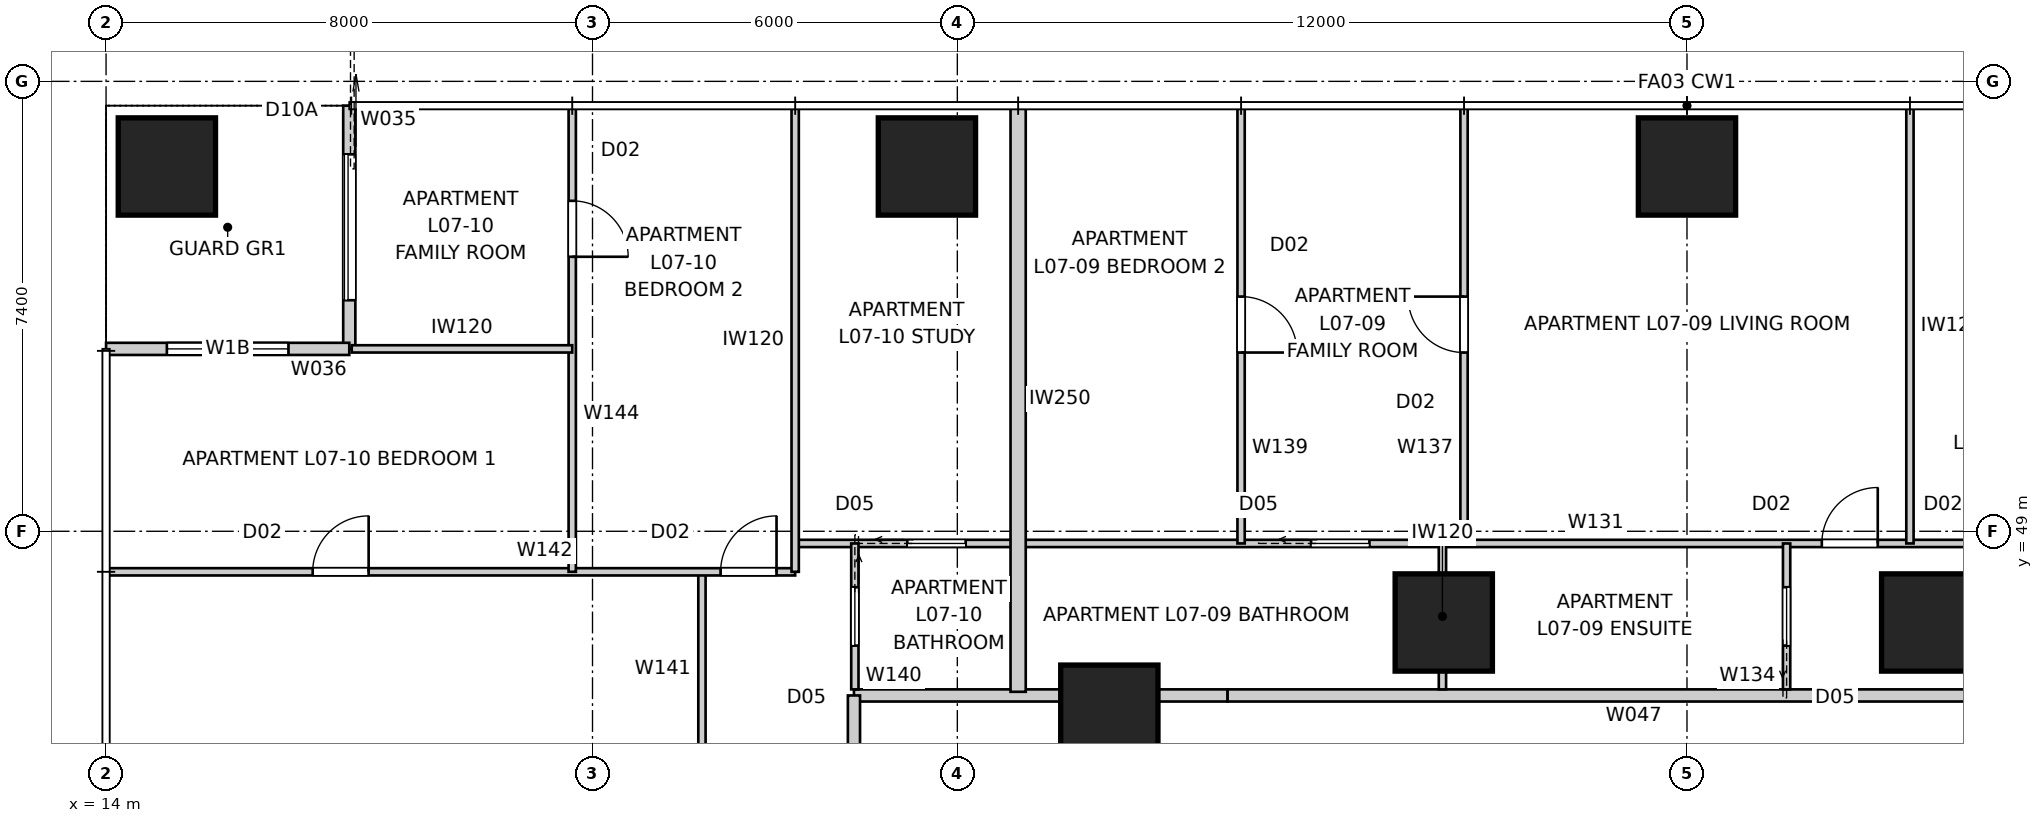
"""IFC4 building model, lengths in metres.
Left out: names, types, materials, properties, quantities, classifications, styles, units other than length and angle.
Written with IfcOpenShell. Run it as: python <this file> out.ifc"""

import sys

from ifc_helpers import new_model, si_unit, direction, frame, frame_2d, origin, origin_2d, place, context, subcontext, project, spatial, rectangle, extrude, element, fill, save


model = new_model("IFC4")
c1 = context("Model", 3, precision=1e-05, world=origin(), true_north=direction((0.0, 1.0)))
c2 = subcontext(c1, "Body", "Model", "MODEL_VIEW")
j1 = project(units=[si_unit("LENGTHUNIT", "METRE"), si_unit("PLANEANGLEUNIT", "RADIAN")], contexts=[c1])
p1 = place(None, origin())
s1 = spatial("IfcSite", under=j1, at=p1, CompositionType="ELEMENT")
p2 = place(p1, origin())
s2 = spatial("IfcBuilding", under=s1, at=p2, CompositionType="ELEMENT")
p3 = place(p2, frame((0.0, 0.0, 28.6)))
s3 = spatial("IfcBuildingStorey", under=s2, at=p3, CompositionType="ELEMENT", Elevation=28.6)
for number, where, z_axis, x_axis in (
    (1, (40.0, 55.0, 0.0), (0.0, 0.0, 1.0), (1.0, 0.0, 0.0)),
    (2, (27.5, 55.0, 0.0), (0.0, 0.0, 1.0), (1.0, 0.0, 0.0)),
    (3, (15.0, 55.0, 0.0), (0.0, 0.0, 1.0), (1.0, 0.0, 0.0)),
    (4, (44.0, 47.5, 0.0), (0.0, 0.0, 1.0), (1.0, 0.0, 0.0)),
    (5, (36.0, 47.5, 0.0), (0.0, 0.0, 1.0), (1.0, 0.0, 0.0)),
    (6, (30.5, 46.0, 0.0), (0.0, 0.0, 1.0), (1.0, 0.0, 0.0)),
):
    element("IfcColumn", number, at=place(p3, frame(where, z_axis=z_axis, x_axis=x_axis)), inside=s3, PredefinedType="COLUMN", context=c2, shape_type="SweptSolid", body=[
        extrude(rectangle(XDim=1.6, YDim=1.6, at=origin_2d()), origin(), (0.0, 0.0, 1.0), 3.4),
    ])
p4 = place(p3, frame((18.0, 56.0, 0.0), z_axis=(0.0, 0.0, 1.0), x_axis=(0.0, -1.0, 0.0)))
e7 = element("IfcWall", 7, at=p4, inside=s3, PredefinedType="SOLIDWALL", context=c2, shape_type="SweptSolid", body=[
    extrude(rectangle(XDim=4.0, YDim=0.2, at=frame_2d((2.0, 0.0))), origin(), (0.0, 0.0, 1.0), 3.25),
])
p5 = place(p4, frame((0.8, 0.0, 0.0)))
e8 = element("IfcOpeningElement", 8, at=p5, cuts=e7, PredefinedType="OPENING", context=c2, shape_type="SweptSolid", body=[
    extrude(rectangle(XDim=2.4, YDim=2.1, at=frame_2d((1.2, 1.05))), frame((0.0, 0.11, 0.0), z_axis=(0.0, -1.0, 0.0), x_axis=(1.0, 0.0, 0.0)), (0.0, 0.0, 1.0), 0.22),
])
p6 = place(p3, frame((18.0, 52.0, 0.0), z_axis=(0.0, 0.0, 1.0), x_axis=(-1.0, 0.0, 0.0)))
e9 = element("IfcWall", 9, at=p6, inside=s3, PredefinedType="SOLIDWALL", context=c2, shape_type="SweptSolid", body=[
    extrude(rectangle(XDim=4.0, YDim=0.2, at=frame_2d((2.0, 0.0))), origin(), (0.0, 0.0, 1.0), 3.25),
])
p7 = place(p6, frame((1.0, 0.0, 0.45)))
e10 = element("IfcOpeningElement", 10, at=p7, cuts=e9, PredefinedType="OPENING", context=c2, shape_type="SweptSolid", body=[
    extrude(rectangle(XDim=2.0, YDim=1.8, at=frame_2d((1.0, 0.9))), frame((0.0, 0.11, 0.0), z_axis=(0.0, -1.0, 0.0), x_axis=(1.0, 0.0, 0.0)), (0.0, 0.0, 1.0), 0.22),
])
p8 = place(p3, frame((47.558, 46.3, 0.0), z_axis=(0.0, 0.0, 1.0), x_axis=(-1.0, 0.0, 0.0)))
e11 = element("IfcWall", 11, at=p8, inside=s3, PredefinedType="PARTITIONING", context=c2, shape_type="SweptSolid", body=[
    extrude(rectangle(XDim=15.117, YDim=0.2, at=frame_2d((7.558, 0.0))), origin(), (0.0, 0.0, 1.0), 3.25),
])
p9 = place(p8, frame((0.729, 0.0, 0.0)))
e12 = element("IfcOpeningElement", 12, at=p9, cuts=e11, PredefinedType="OPENING", context=c2, shape_type="SweptSolid", body=[
    extrude(rectangle(XDim=1.02, YDim=2.34, at=frame_2d((0.51, 1.17))), frame((0.0, 0.11, 0.0), z_axis=(0.0, -1.0, 0.0), x_axis=(1.0, 0.0, 0.0)), (0.0, 0.0, 1.0), 0.22),
])
p10 = place(p3, frame((32.442, 46.3, 0.0), z_axis=(0.0, 0.0, 1.0), x_axis=(-1.0, 0.0, 0.0)))
e13 = element("IfcWall", 13, at=p10, inside=s3, PredefinedType="PARTITIONING", context=c2, shape_type="SweptSolid", body=[
    extrude(rectangle(XDim=1.683, YDim=0.2, at=frame_2d((0.842, 0.0))), origin(), (0.0, 0.0, 1.0), 2.55),
])
p11 = place(p3, frame((30.758, 46.3, 0.0), z_axis=(0.0, 0.0, 1.0), x_axis=(-1.0, 0.0, 0.0)))
e14 = element("IfcWall", 14, at=p11, inside=s3, PredefinedType="PARTITIONING", context=c2, shape_type="SweptSolid", body=[
    extrude(rectangle(XDim=4.458, YDim=0.2, at=frame_2d((2.229, 0.0))), origin(), (0.0, 0.0, 1.0), 3.25),
])
p12 = place(p3, frame((26.3, 46.3, 0.0), z_axis=(0.0, 0.0, 1.0), x_axis=(0.0, -1.0, 0.0)))
e15 = element("IfcWall", 15, at=p12, inside=s3, PredefinedType="PARTITIONING", context=c2, shape_type="SweptSolid", body=[
    extrude(rectangle(XDim=32.6, YDim=0.2, at=frame_2d((16.3, 0.0))), origin(), (0.0, 0.0, 1.0), 3.25),
])
p13 = place(p12, frame((2.315, 0.0, 0.0)))
e16 = element("IfcOpeningElement", 16, at=p13, cuts=e15, PredefinedType="OPENING", context=c2, shape_type="SweptSolid", body=[
    extrude(rectangle(XDim=1.02, YDim=2.34, at=frame_2d((0.51, 1.17))), frame((0.0, 0.11, 0.0), z_axis=(0.0, -1.0, 0.0), x_axis=(1.0, 0.0, 0.0)), (0.0, 0.0, 1.0), 0.22),
])
p14 = place(p12, frame((10.624, 0.0, 0.0)))
e17 = element("IfcOpeningElement", 17, at=p14, cuts=e15, PredefinedType="OPENING", context=c2, shape_type="SweptSolid", body=[
    extrude(rectangle(XDim=1.02, YDim=2.34, at=frame_2d((0.51, 1.17))), frame((0.0, 0.11, 0.0), z_axis=(0.0, -1.0, 0.0), x_axis=(1.0, 0.0, 0.0)), (0.0, 0.0, 1.0), 0.22),
])
p15 = place(p12, frame((17.848, 0.0, 0.0)))
e18 = element("IfcOpeningElement", 18, at=p15, cuts=e15, PredefinedType="OPENING", context=c2, shape_type="SweptSolid", body=[
    extrude(rectangle(XDim=1.02, YDim=2.34, at=frame_2d((0.51, 1.17))), frame((0.0, 0.11, 0.0), z_axis=(0.0, -1.0, 0.0), x_axis=(1.0, 0.0, 0.0)), (0.0, 0.0, 1.0), 0.22),
])
p16 = place(p12, frame((30.516, 0.0, 0.0)))
e19 = element("IfcOpeningElement", 19, at=p16, cuts=e15, PredefinedType="OPENING", context=c2, shape_type="SweptSolid", body=[
    extrude(rectangle(XDim=1.02, YDim=2.34, at=frame_2d((0.51, 1.17))), frame((0.0, 0.11, 0.0), z_axis=(0.0, -1.0, 0.0), x_axis=(1.0, 0.0, 0.0)), (0.0, 0.0, 1.0), 0.22),
])
p17 = place(p3, frame((29.0, 56.0, 0.0), z_axis=(0.0, 0.0, 1.0), x_axis=(0.0, -1.0, 0.0)))
e20 = element("IfcWall", 20, at=p17, inside=s3, PredefinedType="PARTITIONING", context=c2, shape_type="SweptSolid", body=[
    extrude(rectangle(XDim=9.64, YDim=0.25, at=frame_2d((4.82, 0.0))), origin(), (0.0, 0.0, 1.0), 3.25),
])
p18 = place(p3, frame((25.333, 48.8, 0.0), z_axis=(0.0, 0.0, 1.0), x_axis=(1.0, 0.0, 0.0)))
e21 = element("IfcWall", 21, at=p18, inside=s3, PredefinedType="PARTITIONING", context=c2, shape_type="SweptSolid", body=[
    extrude(rectangle(XDim=29.333, YDim=0.12, at=frame_2d((14.667, 0.0))), origin(), (0.0, 0.0, 1.0), 3.25),
])
p19 = place(p18, frame((19.707, 0.0, 0.0)))
e22 = element("IfcOpeningElement", 22, at=p19, cuts=e21, PredefinedType="OPENING", context=c2, shape_type="SweptSolid", body=[
    extrude(rectangle(XDim=0.92, YDim=2.34, at=frame_2d((0.46, 1.17))), frame((0.0, 0.07, 0.0), z_axis=(0.0, -1.0, 0.0), x_axis=(1.0, 0.0, 0.0)), (0.0, 0.0, 1.0), 0.14),
])
p20 = place(p18, frame((23.348, 0.0, 0.0)))
e23 = element("IfcOpeningElement", 23, at=p20, cuts=e21, PredefinedType="OPENING", context=c2, shape_type="SweptSolid", body=[
    extrude(rectangle(XDim=0.92, YDim=2.34, at=frame_2d((0.46, 1.17))), frame((0.0, 0.07, 0.0), z_axis=(0.0, -1.0, 0.0), x_axis=(1.0, 0.0, 0.0)), (0.0, 0.0, 1.0), 0.14),
])
p21 = place(p18, frame((16.884, 0.0, 0.0)))
e24 = element("IfcOpeningElement", 24, at=p21, cuts=e21, PredefinedType="OPENING", context=c2, shape_type="SweptSolid", body=[
    extrude(rectangle(XDim=0.92, YDim=2.34, at=frame_2d((0.46, 1.17))), frame((0.0, 0.07, 0.0), z_axis=(0.0, -1.0, 0.0), x_axis=(1.0, 0.0, 0.0)), (0.0, 0.0, 1.0), 0.14),
])
p22 = place(p18, frame((26.549, 0.0, 0.0)))
e25 = element("IfcOpeningElement", 25, at=p22, cuts=e21, PredefinedType="OPENING", context=c2, shape_type="SweptSolid", body=[
    extrude(rectangle(XDim=0.96, YDim=2.1, at=frame_2d((0.48, 1.05))), frame((0.0, 0.07, 0.0), z_axis=(0.0, -1.0, 0.0), x_axis=(1.0, 0.0, 0.0)), (0.0, 0.0, 1.0), 0.14),
])
p23 = place(p18, frame((1.844, 0.0, 0.0)))
e26 = element("IfcOpeningElement", 26, at=p23, cuts=e21, PredefinedType="OPENING", context=c2, shape_type="SweptSolid", body=[
    extrude(rectangle(XDim=0.96, YDim=2.1, at=frame_2d((0.48, 1.05))), frame((0.0, 0.07, 0.0), z_axis=(0.0, -1.0, 0.0), x_axis=(1.0, 0.0, 0.0)), (0.0, 0.0, 1.0), 0.14),
])
p24 = place(p18, frame((8.484, 0.0, 0.0)))
e27 = element("IfcOpeningElement", 27, at=p24, cuts=e21, PredefinedType="OPENING", context=c2, shape_type="SweptSolid", body=[
    extrude(rectangle(XDim=0.96, YDim=2.1, at=frame_2d((0.48, 1.05))), frame((0.0, 0.07, 0.0), z_axis=(0.0, -1.0, 0.0), x_axis=(1.0, 0.0, 0.0)), (0.0, 0.0, 1.0), 0.14),
])
p25 = place(p3, frame((41.638, 46.4, 0.0), z_axis=(0.0, 0.0, 1.0), x_axis=(0.0, 1.0, 0.0)))
e28 = element("IfcWall", 28, at=p25, inside=s3, PredefinedType="PARTITIONING", context=c2, shape_type="SweptSolid", body=[
    extrude(rectangle(XDim=2.4, YDim=0.12, at=frame_2d((1.2, 0.0))), origin(), (0.0, 0.0, 1.0), 3.25),
])
p26 = place(p25, frame((0.72, 0.0, 0.0)))
e29 = element("IfcOpeningElement", 29, at=p26, cuts=e28, PredefinedType="OPENING", context=c2, shape_type="SweptSolid", body=[
    extrude(rectangle(XDim=0.96, YDim=2.1, at=frame_2d((0.48, 1.05))), frame((0.0, 0.07, 0.0), z_axis=(0.0, -1.0, 0.0), x_axis=(1.0, 0.0, 0.0)), (0.0, 0.0, 1.0), 0.14),
])
p27 = place(p3, frame((35.978, 48.8, 0.0), z_axis=(0.0, 0.0, 1.0), x_axis=(0.0, -1.0, 0.0)))
e30 = element("IfcWall", 30, at=p27, inside=s3, PredefinedType="PARTITIONING", context=c2, shape_type="SweptSolid", body=[
    extrude(rectangle(XDim=2.4, YDim=0.12, at=frame_2d((1.2, 0.0))), origin(), (0.0, 0.0, 1.0), 3.25),
])
p28 = place(p3, frame((43.667, 55.96, 0.0), z_axis=(0.0, 0.0, 1.0), x_axis=(0.0, -1.0, 0.0)))
e31 = element("IfcWall", 31, at=p28, inside=s3, PredefinedType="PARTITIONING", context=c2, shape_type="SweptSolid", body=[
    extrude(rectangle(XDim=7.16, YDim=0.12, at=frame_2d((3.58, 0.0))), origin(), (0.0, 0.0, 1.0), 3.25),
])
p29 = place(p3, frame((36.333, 48.8, 0.0), z_axis=(0.0, 0.0, 1.0), x_axis=(0.0, 1.0, 0.0)))
e32 = element("IfcWall", 32, at=p29, inside=s3, PredefinedType="PARTITIONING", context=c2, shape_type="SweptSolid", body=[
    extrude(rectangle(XDim=7.16, YDim=0.12, at=frame_2d((3.58, 0.0))), origin(), (0.0, 0.0, 1.0), 3.25),
])
p30 = place(p29, frame((3.14, 0.0, 0.0)))
e33 = element("IfcOpeningElement", 33, at=p30, cuts=e32, PredefinedType="OPENING", context=c2, shape_type="SweptSolid", body=[
    extrude(rectangle(XDim=0.92, YDim=2.34, at=frame_2d((0.46, 1.17))), frame((0.0, 0.07, 0.0), z_axis=(0.0, -1.0, 0.0), x_axis=(1.0, 0.0, 0.0)), (0.0, 0.0, 1.0), 0.14),
])
p31 = place(p3, frame((32.667, 55.96, 0.0), z_axis=(0.0, 0.0, 1.0), x_axis=(0.0, -1.0, 0.0)))
e34 = element("IfcWall", 34, at=p31, inside=s3, PredefinedType="PARTITIONING", context=c2, shape_type="SweptSolid", body=[
    extrude(rectangle(XDim=7.16, YDim=0.12, at=frame_2d((3.58, 0.0))), origin(), (0.0, 0.0, 1.0), 3.25),
])
p32 = place(p31, frame((3.1, 0.0, 0.0)))
e35 = element("IfcOpeningElement", 35, at=p32, cuts=e34, PredefinedType="OPENING", context=c2, shape_type="SweptSolid", body=[
    extrude(rectangle(XDim=0.92, YDim=2.34, at=frame_2d((0.46, 1.17))), frame((0.0, 0.07, 0.0), z_axis=(0.0, -1.0, 0.0), x_axis=(1.0, 0.0, 0.0)), (0.0, 0.0, 1.0), 0.14),
])
p33 = place(p3, frame((26.315, 48.8, 0.0), z_axis=(0.0, 0.0, 1.0), x_axis=(0.0, -1.0, 0.0)))
e36 = element("IfcWall", 36, at=p33, inside=s3, PredefinedType="PARTITIONING", context=c2, shape_type="SweptSolid", body=[
    extrude(rectangle(XDim=2.4, YDim=0.12, at=frame_2d((1.2, 0.0))), origin(), (0.0, 0.0, 1.0), 3.25),
])
p34 = place(p33, frame((0.72, 0.0, 0.0)))
e37 = element("IfcOpeningElement", 37, at=p34, cuts=e36, PredefinedType="OPENING", context=c2, shape_type="SweptSolid", body=[
    extrude(rectangle(XDim=0.96, YDim=2.1, at=frame_2d((0.48, 1.05))), frame((0.0, 0.07, 0.0), z_axis=(0.0, -1.0, 0.0), x_axis=(1.0, 0.0, 0.0)), (0.0, 0.0, 1.0), 0.14),
])
p35 = place(p3, frame((23.8, 41.0, 0.0), z_axis=(0.0, 0.0, 1.0), x_axis=(0.0, 1.0, 0.0)))
e38 = element("IfcWall", 38, at=p35, inside=s3, PredefinedType="PARTITIONING", context=c2, shape_type="SweptSolid", body=[
    extrude(rectangle(XDim=7.333, YDim=0.12, at=frame_2d((3.667, 0.0))), origin(), (0.0, 0.0, 1.0), 3.25),
])
p36 = place(p35, frame((3.207, 0.0, 0.0)))
e39 = element("IfcOpeningElement", 39, at=p36, cuts=e38, PredefinedType="OPENING", context=c2, shape_type="SweptSolid", body=[
    extrude(rectangle(XDim=0.92, YDim=2.34, at=frame_2d((0.46, 1.17))), frame((0.0, 0.07, 0.0), z_axis=(0.0, -1.0, 0.0), x_axis=(1.0, 0.0, 0.0)), (0.0, 0.0, 1.0), 0.14),
])
p37 = place(p3, frame((14.04, 48.333, 0.0), z_axis=(0.0, 0.0, 1.0), x_axis=(1.0, 0.0, 0.0)))
e40 = element("IfcWall", 40, at=p37, inside=s3, PredefinedType="PARTITIONING", context=c2, shape_type="SweptSolid", body=[
    extrude(rectangle(XDim=11.293, YDim=0.12, at=frame_2d((5.646, 0.0))), origin(), (0.0, 0.0, 1.0), 3.25),
])
p38 = place(p37, frame((10.067, 0.0, 0.0)))
e41 = element("IfcOpeningElement", 41, at=p38, cuts=e40, PredefinedType="OPENING", context=c2, shape_type="SweptSolid", body=[
    extrude(rectangle(XDim=0.92, YDim=2.34, at=frame_2d((0.46, 1.17))), frame((0.0, 0.07, 0.0), z_axis=(0.0, -1.0, 0.0), x_axis=(1.0, 0.0, 0.0)), (0.0, 0.0, 1.0), 0.14),
])
p39 = place(p37, frame((3.358, 0.0, 0.0)))
e42 = element("IfcOpeningElement", 42, at=p39, cuts=e40, PredefinedType="OPENING", context=c2, shape_type="SweptSolid", body=[
    extrude(rectangle(XDim=0.92, YDim=2.34, at=frame_2d((0.46, 1.17))), frame((0.0, 0.07, 0.0), z_axis=(0.0, -1.0, 0.0), x_axis=(1.0, 0.0, 0.0)), (0.0, 0.0, 1.0), 0.14),
])
p40 = place(p3, frame((25.333, 48.333, 0.0), z_axis=(0.0, 0.0, 1.0), x_axis=(0.0, 1.0, 0.0)))
e43 = element("IfcWall", 43, at=p40, inside=s3, PredefinedType="PARTITIONING", context=c2, shape_type="SweptSolid", body=[
    extrude(rectangle(XDim=7.627, YDim=0.12, at=frame_2d((3.813, 0.0))), origin(), (0.0, 0.0, 1.0), 2.638),
])
p41 = place(p3, frame((21.667, 55.96, 0.0), z_axis=(0.0, 0.0, 1.0), x_axis=(0.0, -1.0, 0.0)))
e44 = element("IfcWall", 44, at=p41, inside=s3, PredefinedType="PARTITIONING", context=c2, shape_type="SweptSolid", body=[
    extrude(rectangle(XDim=7.627, YDim=0.12, at=frame_2d((3.813, 0.0))), origin(), (0.0, 0.0, 1.0), 3.25),
])
p42 = place(p41, frame((1.525, 0.0, 0.0)))
e45 = element("IfcOpeningElement", 45, at=p42, cuts=e44, PredefinedType="OPENING", context=c2, shape_type="SweptSolid", body=[
    extrude(rectangle(XDim=0.92, YDim=2.34, at=frame_2d((0.46, 1.17))), frame((0.0, 0.07, 0.0), z_axis=(0.0, -1.0, 0.0), x_axis=(1.0, 0.0, 0.0)), (0.0, 0.0, 1.0), 0.14),
])
p43 = place(p3, frame((18.04, 52.0, 0.0), z_axis=(0.0, 0.0, 1.0), x_axis=(1.0, 0.0, 0.0)))
e46 = element("IfcWall", 46, at=p43, inside=s3, PredefinedType="PARTITIONING", context=c2, shape_type="SweptSolid", body=[
    extrude(rectangle(XDim=3.627, YDim=0.12, at=frame_2d((1.813, 0.0))), origin(), (0.0, 0.0, 1.0), 3.25),
])
p44 = place(p5, origin())
e47 = element("IfcDoor", 47, at=p44, inside=s3, OperationType="SLIDING_TO_LEFT", PredefinedType="DOOR", context=c2, shape_type="SweptSolid", body=[
    extrude(rectangle(XDim=2.4, YDim=2.1, at=frame_2d((1.2, 1.05))), frame((0.0, 0.025, 0.0), z_axis=(0.0, -1.0, 0.0), x_axis=(1.0, 0.0, 0.0)), (0.0, 0.0, 1.0), 0.05),
])
fill(e8, e47)
p45 = place(p7, origin())
e48 = element("IfcWindow", 48, at=p45, inside=s3, PartitioningType="SINGLE_PANEL", PredefinedType="WINDOW", context=c2, shape_type="SweptSolid", body=[
    extrude(rectangle(XDim=2.0, YDim=1.8, at=frame_2d((1.0, 0.9))), frame((0.0, 0.03, 0.0), z_axis=(0.0, -1.0, 0.0), x_axis=(1.0, 0.0, 0.0)), (0.0, 0.0, 1.0), 0.06),
])
fill(e10, e48)
p46 = place(p26, origin())
e49 = element("IfcDoor", 49, at=p46, inside=s3, OperationType="SLIDING_TO_LEFT", PredefinedType="DOOR", context=c2, shape_type="SweptSolid", body=[
    extrude(rectangle(XDim=0.96, YDim=2.1, at=frame_2d((0.48, 1.05))), frame((0.0, 0.025, 0.0), z_axis=(0.0, -1.0, 0.0), x_axis=(1.0, 0.0, 0.0)), (0.0, 0.0, 1.0), 0.05),
])
fill(e29, e49)
p47 = place(p21, origin())
e50 = element("IfcDoor", 50, at=p47, inside=s3, OperationType="SINGLE_SWING_RIGHT", PredefinedType="DOOR", context=c2, shape_type="SweptSolid", body=[
    extrude(rectangle(XDim=0.92, YDim=2.34, at=frame_2d((0.46, 1.17))), frame((0.0, 0.025, 0.0), z_axis=(0.0, -1.0, 0.0), x_axis=(1.0, 0.0, 0.0)), (0.0, 0.0, 1.0), 0.05),
])
fill(e24, e50)
p48 = place(p34, origin())
e51 = element("IfcDoor", 51, at=p48, inside=s3, OperationType="SLIDING_TO_LEFT", PredefinedType="DOOR", context=c2, shape_type="SweptSolid", body=[
    extrude(rectangle(XDim=0.96, YDim=2.1, at=frame_2d((0.48, 1.05))), frame((0.0, 0.025, 0.0), z_axis=(0.0, -1.0, 0.0), x_axis=(1.0, 0.0, 0.0)), (0.0, 0.0, 1.0), 0.05),
])
fill(e37, e51)
p49 = place(p38, origin())
e52 = element("IfcDoor", 52, at=p49, inside=s3, OperationType="SINGLE_SWING_RIGHT", PredefinedType="DOOR", context=c2, shape_type="SweptSolid", body=[
    extrude(rectangle(XDim=0.92, YDim=2.34, at=frame_2d((0.46, 1.17))), frame((0.0, 0.025, 0.0), z_axis=(0.0, -1.0, 0.0), x_axis=(1.0, 0.0, 0.0)), (0.0, 0.0, 1.0), 0.05),
])
fill(e41, e52)
p50 = place(p30, origin())
e53 = element("IfcDoor", 53, at=p50, inside=s3, OperationType="SINGLE_SWING_RIGHT", PredefinedType="DOOR", context=c2, shape_type="SweptSolid", body=[
    extrude(rectangle(XDim=0.92, YDim=2.34, at=frame_2d((0.46, 1.17))), frame((0.0, 0.025, 0.0), z_axis=(0.0, -1.0, 0.0), x_axis=(1.0, 0.0, 0.0)), (0.0, 0.0, 1.0), 0.05),
])
fill(e33, e53)
p51 = place(p39, origin())
e54 = element("IfcDoor", 54, at=p51, inside=s3, OperationType="SINGLE_SWING_RIGHT", PredefinedType="DOOR", context=c2, shape_type="SweptSolid", body=[
    extrude(rectangle(XDim=0.92, YDim=2.34, at=frame_2d((0.46, 1.17))), frame((0.0, 0.025, 0.0), z_axis=(0.0, -1.0, 0.0), x_axis=(1.0, 0.0, 0.0)), (0.0, 0.0, 1.0), 0.05),
])
fill(e42, e54)
p52 = place(p23, origin())
e55 = element("IfcDoor", 55, at=p52, inside=s3, OperationType="SLIDING_TO_LEFT", PredefinedType="DOOR", context=c2, shape_type="SweptSolid", body=[
    extrude(rectangle(XDim=0.96, YDim=2.1, at=frame_2d((0.48, 1.05))), frame((0.0, 0.025, 0.0), z_axis=(0.0, -1.0, 0.0), x_axis=(1.0, 0.0, 0.0)), (0.0, 0.0, 1.0), 0.05),
])
fill(e26, e55)
p53 = place(p32, origin())
e56 = element("IfcDoor", 56, at=p53, inside=s3, OperationType="SINGLE_SWING_RIGHT", PredefinedType="DOOR", context=c2, shape_type="SweptSolid", body=[
    extrude(rectangle(XDim=0.92, YDim=2.34, at=frame_2d((0.46, 1.17))), frame((0.0, 0.025, 0.0), z_axis=(0.0, -1.0, 0.0), x_axis=(1.0, 0.0, 0.0)), (0.0, 0.0, 1.0), 0.05),
])
fill(e35, e56)
p54 = place(p24, origin())
e57 = element("IfcDoor", 57, at=p54, inside=s3, OperationType="SLIDING_TO_LEFT", PredefinedType="DOOR", context=c2, shape_type="SweptSolid", body=[
    extrude(rectangle(XDim=0.96, YDim=2.1, at=frame_2d((0.48, 1.05))), frame((0.0, 0.025, 0.0), z_axis=(0.0, -1.0, 0.0), x_axis=(1.0, 0.0, 0.0)), (0.0, 0.0, 1.0), 0.05),
])
fill(e27, e57)
p55 = place(p42, origin())
e58 = element("IfcDoor", 58, at=p55, inside=s3, OperationType="SINGLE_SWING_RIGHT", PredefinedType="DOOR", context=c2, shape_type="SweptSolid", body=[
    extrude(rectangle(XDim=0.92, YDim=2.34, at=frame_2d((0.46, 1.17))), frame((0.0, 0.025, 0.0), z_axis=(0.0, -1.0, 0.0), x_axis=(1.0, 0.0, 0.0)), (0.0, 0.0, 1.0), 0.05),
])
fill(e45, e58)
save(model, sys.argv[1])
